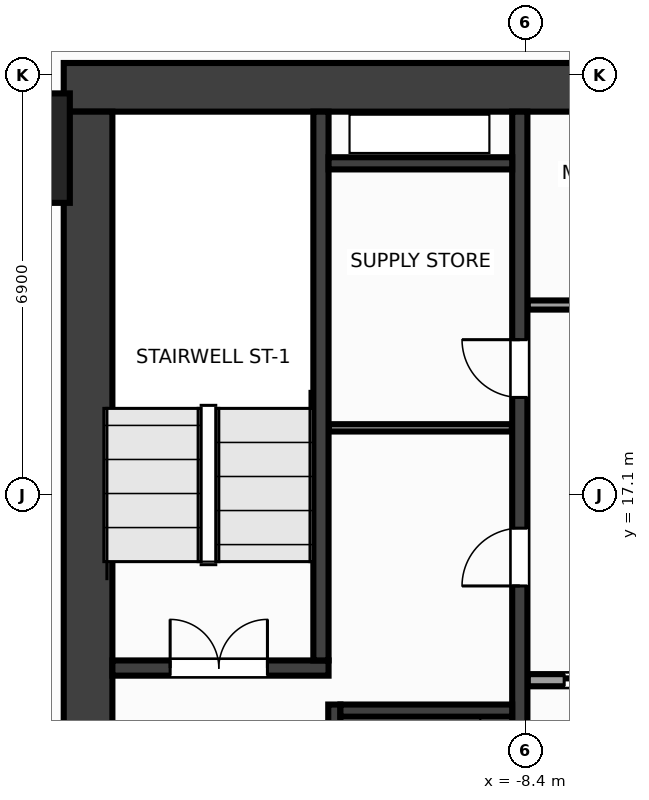
"""IFC4 building model, lengths in metres.
Left out: names, types, materials, properties, quantities, classifications, styles, units other than length and angle.
Written with IfcOpenShell. Run it as: python <this file> out.ifc"""

import sys

from ifc_helpers import new_model, si_unit, direction, frame, frame_2d, origin, origin_2d, place, context, subcontext, project, spatial, rectangle, extrude, source, transform, mapped, element, fill, save


model = new_model("IFC4")
c1 = context("Model", 3, precision=1e-05, world=origin(), true_north=direction((0.0, 1.0)))
c2 = subcontext(c1, "Body", "Model", "MODEL_VIEW")
j1 = project(units=[si_unit("LENGTHUNIT", "METRE"), si_unit("PLANEANGLEUNIT", "RADIAN")], contexts=[c1])
p1 = place(None, origin())
s1 = spatial("IfcSite", under=j1, at=p1, CompositionType="ELEMENT")
p2 = place(p1, origin())
s2 = spatial("IfcBuilding", under=s1, at=p2, CompositionType="ELEMENT")
p3 = place(p2, frame((0.0, 0.0, 59.6)))
s3 = spatial("IfcBuildingStorey", under=s2, at=p3, CompositionType="ELEMENT", Elevation=59.6)
m1 = source(origin(), c2, "Body", "SweptSolid", [
    extrude(rectangle(XDim=32.0, YDim=0.8, at=frame_2d((16.0, 0.0))), origin(), (0.0, 0.0, 1.0), 3.6),
])
p4 = place(p3, frame((-16.0, 23.8, 0.0), z_axis=(0.0, 0.0, 1.0), x_axis=(1.0, 0.0, 0.0)))
e1 = element("IfcWall", 1, at=p4, inside=s3, PredefinedType="SHEAR", context=c2, shape_type="MappedRepresentation", body=[
    mapped(m1, transform((0.0, 0.0, 0.0), x_axis=(1.0, 0.0, 0.0), y_axis=(0.0, 1.0, 0.0), z_axis=(0.0, 0.0, 1.0), scale=1.0)),
])
m2 = source(origin(), c2, "Body", "SweptSolid", [
    extrude(rectangle(XDim=12.8, YDim=0.8, at=frame_2d((6.4, 0.0))), origin(), (0.0, 0.0, 1.0), 3.6),
])
p5 = place(p3, frame((-15.6, 10.6, 0.0), z_axis=(0.0, 0.0, 1.0), x_axis=(0.0, 1.0, 0.0)))
e2 = element("IfcWall", 2, at=p5, inside=s3, PredefinedType="SHEAR", context=c2, shape_type="MappedRepresentation", body=[
    mapped(m2, transform((0.0, 0.0, 0.0), x_axis=(1.0, 0.0, 0.0), y_axis=(0.0, 1.0, 0.0), z_axis=(0.0, 0.0, 1.0), scale=1.0)),
])
m3 = source(origin(), c2, "Body", "SweptSolid", [
    extrude(rectangle(XDim=12.8, YDim=0.25, at=frame_2d((6.4, 0.0))), origin(), (0.0, 0.0, 1.0), 3.6),
])
p6 = place(p3, frame((-8.5, 10.6, 0.0), z_axis=(0.0, 0.0, 1.0), x_axis=(0.0, 1.0, 0.0)))
e3 = element("IfcWall", 3, at=p6, inside=s3, PredefinedType="SHEAR", context=c2, shape_type="MappedRepresentation", body=[
    mapped(m3, transform((0.0, 0.0, 0.0), x_axis=(1.0, 0.0, 0.0), y_axis=(0.0, 1.0, 0.0), z_axis=(0.0, 0.0, 1.0), scale=1.0)),
])
p7 = place(p6, frame((5.0, 0.0, 0.0)))
e4 = element("IfcOpeningElement", 4, at=p7, cuts=e3, PredefinedType="OPENING", context=c2, shape_type="SweptSolid", body=[
    extrude(rectangle(XDim=0.95, YDim=2.15, at=frame_2d((0.475, 1.075))), frame((0.0, 0.137, 0.0), z_axis=(0.0, -1.0, 0.0), x_axis=(1.0, 0.0, 0.0)), (0.0, 0.0, 1.0), 0.274),
])
p8 = place(p6, frame((8.1, 0.0, 0.0)))
e5 = element("IfcOpeningElement", 5, at=p8, cuts=e3, PredefinedType="OPENING", context=c2, shape_type="SweptSolid", body=[
    extrude(rectangle(XDim=0.95, YDim=2.15, at=frame_2d((0.475, 1.075))), frame((0.0, 0.137, 0.0), z_axis=(0.0, -1.0, 0.0), x_axis=(1.0, 0.0, 0.0)), (0.0, 0.0, 1.0), 0.274),
])
m4 = source(origin(), c2, "Body", "SweptSolid", [
    extrude(rectangle(XDim=3.555, YDim=0.25, at=frame_2d((1.777, 0.0))), origin(), (0.0, 0.0, 1.0), 3.6),
])
p9 = place(p3, frame((-15.2, 14.25, 0.0), z_axis=(0.0, 0.0, 1.0), x_axis=(1.0, 0.0, 0.0)))
e6 = element("IfcWall", 6, at=p9, inside=s3, PredefinedType="SHEAR", context=c2, shape_type="MappedRepresentation", body=[
    mapped(m4, transform((0.0, 0.0, 0.0), x_axis=(1.0, 0.0, 0.0), y_axis=(0.0, 1.0, 0.0), z_axis=(0.0, 0.0, 1.0), scale=1.0)),
])
p10 = place(p9, frame((0.95, 0.0, 0.0)))
e7 = element("IfcOpeningElement", 7, at=p10, cuts=e6, PredefinedType="OPENING", context=c2, shape_type="SweptSolid", body=[
    extrude(rectangle(XDim=1.6, YDim=2.15, at=frame_2d((0.8, 1.075))), frame((0.0, 0.137, 0.0), z_axis=(0.0, -1.0, 0.0), x_axis=(1.0, 0.0, 0.0)), (0.0, 0.0, 1.0), 0.274),
])
m5 = source(origin(), c2, "Body", "SweptSolid", [
    extrude(rectangle(XDim=9.025, YDim=0.25, at=frame_2d((4.512, 0.0))), origin(), (0.0, 0.0, 1.0), 3.6),
])
p11 = place(p3, frame((-11.77, 14.375, 0.0), z_axis=(0.0, 0.0, 1.0), x_axis=(0.0, 1.0, 0.0)))
e8 = element("IfcWall", 8, at=p11, inside=s3, PredefinedType="SHEAR", context=c2, shape_type="MappedRepresentation", body=[
    mapped(m5, transform((0.0, 0.0, 0.0), x_axis=(1.0, 0.0, 0.0), y_axis=(0.0, 1.0, 0.0), z_axis=(0.0, 0.0, 1.0), scale=1.0)),
])
m6 = source(origin(), c2, "Body", "SweptSolid", [
    extrude(rectangle(XDim=3.05, YDim=0.2, at=frame_2d((1.525, 0.0))), origin(), (0.0, 0.0, 1.0), 3.6),
])
p12 = place(p3, frame((-11.55, 10.6, 0.0), z_axis=(0.0, 0.0, 1.0), x_axis=(0.0, 1.0, 0.0)))
e9 = element("IfcWall", 9, at=p12, inside=s3, PredefinedType="SHEAR", context=c2, shape_type="MappedRepresentation", body=[
    mapped(m6, transform((0.0, 0.0, 0.0), x_axis=(1.0, 0.0, 0.0), y_axis=(0.0, 1.0, 0.0), z_axis=(0.0, 0.0, 1.0), scale=1.0)),
])
p13 = place(p12, frame((0.9, 0.0, 0.0)))
e10 = element("IfcOpeningElement", 10, at=p13, cuts=e9, PredefinedType="OPENING", context=c2, shape_type="SweptSolid", body=[
    extrude(rectangle(XDim=1.1, YDim=2.15, at=frame_2d((0.55, 1.075))), frame((0.0, 0.112, 0.0), z_axis=(0.0, -1.0, 0.0), x_axis=(1.0, 0.0, 0.0)), (0.0, 0.0, 1.0), 0.224),
])
m7 = source(origin(), c2, "Body", "SweptSolid", [
    extrude(rectangle(XDim=2.825, YDim=0.2, at=frame_2d((1.413, 0.0))), origin(), (0.0, 0.0, 1.0), 3.6),
])
p14 = place(p3, frame((-11.45, 13.55, 0.0), z_axis=(0.0, 0.0, 1.0), x_axis=(1.0, 0.0, 0.0)))
e11 = element("IfcWall", 11, at=p14, inside=s3, PredefinedType="SHEAR", context=c2, shape_type="MappedRepresentation", body=[
    mapped(m7, transform((0.0, 0.0, 0.0), x_axis=(1.0, 0.0, 0.0), y_axis=(0.0, 1.0, 0.0), z_axis=(0.0, 0.0, 1.0), scale=1.0)),
])
m8 = source(origin(), c2, "Body", "SweptSolid", [
    extrude(rectangle(XDim=3.02, YDim=0.2, at=frame_2d((1.51, 0.0))), origin(), (0.0, 0.0, 1.0), 3.6),
])
p15 = place(p3, frame((-11.645, 22.55, 0.0), z_axis=(0.0, 0.0, 1.0), x_axis=(1.0, 0.0, 0.0)))
e12 = element("IfcWall", 12, at=p15, inside=s3, PredefinedType="SHEAR", context=c2, shape_type="MappedRepresentation", body=[
    mapped(m8, transform((0.0, 0.0, 0.0), x_axis=(1.0, 0.0, 0.0), y_axis=(0.0, 1.0, 0.0), z_axis=(0.0, 0.0, 1.0), scale=1.0)),
])
m9 = source(origin(), c2, "Body", "SweptSolid", [
    extrude(rectangle(XDim=1.8, YDim=1.8, at=origin_2d()), origin(), (0.0, 0.0, 1.0), 3.6),
])
p16 = place(p3, frame((-16.8, 22.8, 0.0), z_axis=(0.0, 0.0, 1.0), x_axis=(1.0, 0.0, 0.0)))
e13 = element("IfcColumn", 13, at=p16, inside=s3, PredefinedType="COLUMN", context=c2, shape_type="MappedRepresentation", body=[
    mapped(m9, transform((0.0, 0.0, 0.0), x_axis=(1.0, 0.0, 0.0), y_axis=(0.0, 1.0, 0.0), z_axis=(0.0, 0.0, 1.0), scale=1.0)),
])
m10 = source(origin(), c2, "Body", "SweptSolid", [
    extrude(rectangle(XDim=3.01, YDim=0.12, at=frame_2d((1.505, 0.0))), origin(), (0.0, 0.0, 1.0), 3.36),
])
p17 = place(p3, frame((-11.64, 18.2, 0.0), z_axis=(0.0, 0.0, 1.0), x_axis=(1.0, 0.0, 0.0)))
e14 = element("IfcWall", 14, at=p17, inside=s3, PredefinedType="PARTITIONING", context=c2, shape_type="MappedRepresentation", body=[
    mapped(m10, transform((0.0, 0.0, 0.0), x_axis=(1.0, 0.0, 0.0), y_axis=(0.0, 1.0, 0.0), z_axis=(0.0, 0.0, 1.0), scale=1.0)),
])
m11 = source(origin(), c2, "Body", "SweptSolid", [
    extrude(rectangle(XDim=7.07, YDim=0.2, at=frame_2d((3.535, 0.0))), origin(), (0.0, 0.0, 1.0), 3.36),
])
p18 = place(p3, frame((-8.37, 14.05, 0.0), z_axis=(0.0, 0.0, 1.0), x_axis=(1.0, 0.0, 0.0)))
e15 = element("IfcWall", 15, at=p18, inside=s3, PredefinedType="PARTITIONING", context=c2, shape_type="MappedRepresentation", body=[
    mapped(m11, transform((0.0, 0.0, 0.0), x_axis=(1.0, 0.0, 0.0), y_axis=(0.0, 1.0, 0.0), z_axis=(0.0, 0.0, 1.0), scale=1.0)),
])
p19 = place(p18, frame((0.6, 0.0, 0.0)))
e16 = element("IfcOpeningElement", 16, at=p19, cuts=e15, PredefinedType="OPENING", context=c2, shape_type="SweptSolid", body=[
    extrude(rectangle(XDim=1.1, YDim=2.15, at=frame_2d((0.55, 1.075))), frame((0.0, 0.112, 0.0), z_axis=(0.0, -1.0, 0.0), x_axis=(1.0, 0.0, 0.0)), (0.0, 0.0, 1.0), 0.224),
])
p20 = place(p18, frame((2.95, 0.0, 0.0)))
e17 = element("IfcOpeningElement", 17, at=p20, cuts=e15, PredefinedType="OPENING", context=c2, shape_type="SweptSolid", body=[
    extrude(rectangle(XDim=1.1, YDim=2.15, at=frame_2d((0.55, 1.075))), frame((0.0, 0.112, 0.0), z_axis=(0.0, -1.0, 0.0), x_axis=(1.0, 0.0, 0.0)), (0.0, 0.0, 1.0), 0.224),
])
p21 = place(p18, frame((5.3, 0.0, 0.0)))
e18 = element("IfcOpeningElement", 18, at=p21, cuts=e15, PredefinedType="OPENING", context=c2, shape_type="SweptSolid", body=[
    extrude(rectangle(XDim=1.1, YDim=2.15, at=frame_2d((0.55, 1.075))), frame((0.0, 0.112, 0.0), z_axis=(0.0, -1.0, 0.0), x_axis=(1.0, 0.0, 0.0)), (0.0, 0.0, 1.0), 0.224),
])
m12 = source(origin(), c2, "Body", "SweptSolid", [
    extrude(rectangle(XDim=14.59, YDim=0.15, at=frame_2d((7.295, 0.0))), origin(), (0.0, 0.0, 1.0), 3.36),
])
p22 = place(p3, frame((-8.37, 20.22, 0.0), z_axis=(0.0, 0.0, 1.0), x_axis=(1.0, 0.0, 0.0)))
e19 = element("IfcWall", 19, at=p22, inside=s3, PredefinedType="PARTITIONING", context=c2, shape_type="MappedRepresentation", body=[
    mapped(m12, transform((0.0, 0.0, 0.0), x_axis=(1.0, 0.0, 0.0), y_axis=(0.0, 1.0, 0.0), z_axis=(0.0, 0.0, 1.0), scale=1.0)),
])
p23 = place(p22, frame((0.86, 0.0, 0.0)))
e20 = element("IfcOpeningElement", 20, at=p23, cuts=e19, PredefinedType="OPENING", context=c2, shape_type="SweptSolid", body=[
    extrude(rectangle(XDim=0.9, YDim=2.15, at=frame_2d((0.45, 1.075))), frame((0.0, 0.087, 0.0), z_axis=(0.0, -1.0, 0.0), x_axis=(1.0, 0.0, 0.0)), (0.0, 0.0, 1.0), 0.174),
])
p24 = place(p22, frame((3.47, 0.0, 0.0)))
e21 = element("IfcOpeningElement", 21, at=p24, cuts=e19, PredefinedType="OPENING", context=c2, shape_type="SweptSolid", body=[
    extrude(rectangle(XDim=0.9, YDim=2.15, at=frame_2d((0.45, 1.075))), frame((0.0, 0.087, 0.0), z_axis=(0.0, -1.0, 0.0), x_axis=(1.0, 0.0, 0.0)), (0.0, 0.0, 1.0), 0.174),
])
p25 = place(p22, frame((6.17, 0.0, 0.0)))
e22 = element("IfcOpeningElement", 22, at=p25, cuts=e19, PredefinedType="OPENING", context=c2, shape_type="SweptSolid", body=[
    extrude(rectangle(XDim=0.9, YDim=2.15, at=frame_2d((0.45, 1.075))), frame((0.0, 0.087, 0.0), z_axis=(0.0, -1.0, 0.0), x_axis=(1.0, 0.0, 0.0)), (0.0, 0.0, 1.0), 0.174),
])
p26 = place(p22, frame((9.07, 0.0, 0.0)))
e23 = element("IfcOpeningElement", 23, at=p26, cuts=e19, PredefinedType="OPENING", context=c2, shape_type="SweptSolid", body=[
    extrude(rectangle(XDim=0.9, YDim=2.15, at=frame_2d((0.45, 1.075))), frame((0.0, 0.087, 0.0), z_axis=(0.0, -1.0, 0.0), x_axis=(1.0, 0.0, 0.0)), (0.0, 0.0, 1.0), 0.174),
])
p27 = place(p22, frame((12.32, 0.0, 0.0)))
e24 = element("IfcOpeningElement", 24, at=p27, cuts=e19, PredefinedType="OPENING", context=c2, shape_type="SweptSolid", body=[
    extrude(rectangle(XDim=0.9, YDim=2.15, at=frame_2d((0.45, 1.075))), frame((0.0, 0.087, 0.0), z_axis=(0.0, -1.0, 0.0), x_axis=(1.0, 0.0, 0.0)), (0.0, 0.0, 1.0), 0.174),
])
m13 = source(origin(), c2, "Body", "SweptSolid", [
    extrude(rectangle(XDim=1.6, YDim=2.15, at=frame_2d((0.8, 1.075))), frame((0.0, 0.025, 0.0), z_axis=(0.0, -1.0, 0.0), x_axis=(1.0, 0.0, 0.0)), (0.0, 0.0, 1.0), 0.05),
])
p28 = place(p10, origin())
e25 = element("IfcDoor", 25, at=p28, inside=s3, OperationType="DOUBLE_DOOR_SINGLE_SWING", PredefinedType="DOOR", context=c2, shape_type="MappedRepresentation", body=[
    mapped(m13, transform((0.0, 0.0, 0.0), x_axis=(1.0, 0.0, 0.0), y_axis=(0.0, 1.0, 0.0), z_axis=(0.0, 0.0, 1.0), scale=1.0)),
])
fill(e7, e25)
m14 = source(origin(), c2, "Body", "SweptSolid", [
    extrude(rectangle(XDim=0.95, YDim=2.15, at=frame_2d((0.475, 1.075))), frame((0.0, 0.025, 0.0), z_axis=(0.0, -1.0, 0.0), x_axis=(1.0, 0.0, 0.0)), (0.0, 0.0, 1.0), 0.05),
])
p29 = place(p7, origin())
e26 = element("IfcDoor", 26, at=p29, inside=s3, OperationType="SINGLE_SWING_LEFT", PredefinedType="DOOR", context=c2, shape_type="MappedRepresentation", body=[
    mapped(m14, transform((0.0, 0.0, 0.0), x_axis=(1.0, 0.0, 0.0), y_axis=(0.0, 1.0, 0.0), z_axis=(0.0, 0.0, 1.0), scale=1.0)),
])
fill(e4, e26)
p30 = place(p8, origin())
e27 = element("IfcDoor", 27, at=p30, inside=s3, OperationType="SINGLE_SWING_RIGHT", PredefinedType="DOOR", context=c2, shape_type="MappedRepresentation", body=[
    mapped(m14, transform((0.0, 0.0, 0.0), x_axis=(1.0, 0.0, 0.0), y_axis=(0.0, 1.0, 0.0), z_axis=(0.0, 0.0, 1.0), scale=1.0)),
])
fill(e5, e27)
m15 = source(origin(), c2, "Body", "SweptSolid", [
    extrude(rectangle(XDim=1.1, YDim=2.15, at=frame_2d((0.55, 1.075))), frame((0.0, 0.025, 0.0), z_axis=(0.0, -1.0, 0.0), x_axis=(1.0, 0.0, 0.0)), (0.0, 0.0, 1.0), 0.05),
])
p31 = place(p19, origin())
e28 = element("IfcDoor", 28, at=p31, inside=s3, OperationType="DOUBLE_DOOR_SLIDING", PredefinedType="DOOR", context=c2, shape_type="MappedRepresentation", body=[
    mapped(m15, transform((0.0, 0.0, 0.0), x_axis=(1.0, 0.0, 0.0), y_axis=(0.0, 1.0, 0.0), z_axis=(0.0, 0.0, 1.0), scale=1.0)),
])
fill(e16, e28)
save(model, sys.argv[1])
